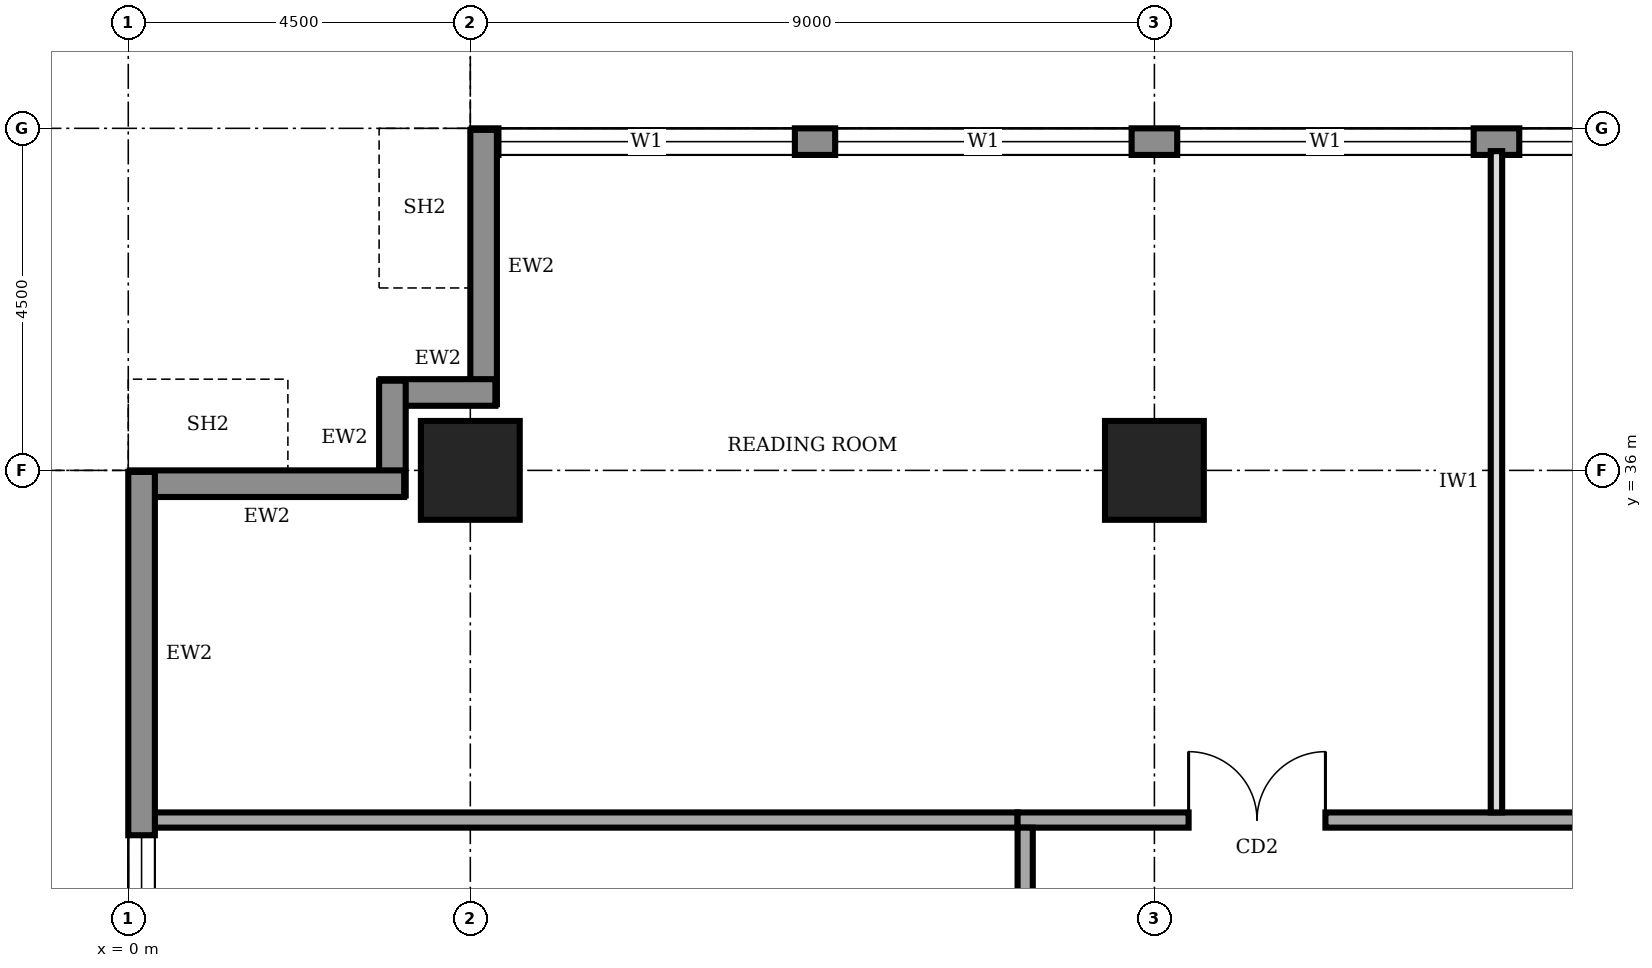
"""IFC4 building model, lengths in metres.
Left out: names, types, materials, properties, quantities, classifications, styles, units other than length and angle.
Written with IfcOpenShell. Run it as: python <this file> out.ifc"""

import sys

from ifc_helpers import new_model, si_unit, direction, frame, frame_2d, origin, origin_2d, place, context, subcontext, project, spatial, rectangle, extrude, element, fill, save


model = new_model("IFC4")
c1 = context("Model", 3, precision=1e-05, world=origin(), true_north=direction((0.0, 1.0)))
c2 = subcontext(c1, "Body", "Model", "MODEL_VIEW")
j1 = project(units=[si_unit("LENGTHUNIT", "METRE"), si_unit("PLANEANGLEUNIT", "RADIAN")], contexts=[c1])
p1 = place(None, origin())
s1 = spatial("IfcSite", under=j1, at=p1, CompositionType="ELEMENT")
p2 = place(p1, origin())
s2 = spatial("IfcBuilding", under=s1, at=p2, CompositionType="ELEMENT")
p3 = place(p2, frame((0.0, 0.0, 285.0)))
s3 = spatial("IfcBuildingStorey", under=s2, at=p3, CompositionType="ELEMENT", Elevation=285.0)
for number, where, z_axis, x_axis in (
    (1, (4.5, 36.0, 0.0), (0.0, 0.0, 1.0), (1.0, 0.0, 0.0)),
    (2, (13.5, 36.0, 0.0), (0.0, 0.0, 1.0), (1.0, 0.0, 0.0)),
):
    element("IfcColumn", number, at=place(p3, frame(where, z_axis=z_axis, x_axis=x_axis)), inside=s3, PredefinedType="COLUMN", context=c2, shape_type="SweptSolid", body=[
        extrude(rectangle(XDim=1.3, YDim=1.3, at=origin_2d()), origin(), (0.0, 0.0, 1.0), 4.0),
    ])
p4 = place(p3, frame((35.98, 40.325, 0.0), z_axis=(0.0, 0.0, 1.0), x_axis=(-1.0, 0.0, 0.0)))
e3 = element("IfcWall", 3, at=p4, inside=s3, PredefinedType="STANDARD", context=c2, shape_type="SweptSolid", body=[
    extrude(rectangle(XDim=31.46, YDim=0.35, at=frame_2d((15.73, 0.0))), origin(), (0.0, 0.0, 1.0), 3.75),
])
p5 = place(p4, frame((27.21, 0.0, 0.9)))
e4 = element("IfcOpeningElement", 4, at=p5, cuts=e3, PredefinedType="OPENING", context=c2, shape_type="SweptSolid", body=[
    extrude(rectangle(XDim=3.9, YDim=2.2, at=frame_2d((1.95, 1.1))), frame((0.0, 0.185, 0.0), z_axis=(0.0, -1.0, 0.0), x_axis=(1.0, 0.0, 0.0)), (0.0, 0.0, 1.0), 0.37),
])
p6 = place(p4, frame((22.78, 0.0, 0.9)))
e5 = element("IfcOpeningElement", 5, at=p6, cuts=e3, PredefinedType="OPENING", context=c2, shape_type="SweptSolid", body=[
    extrude(rectangle(XDim=3.9, YDim=2.2, at=frame_2d((1.95, 1.1))), frame((0.0, 0.185, 0.0), z_axis=(0.0, -1.0, 0.0), x_axis=(1.0, 0.0, 0.0)), (0.0, 0.0, 1.0), 0.37),
])
p7 = place(p4, frame((18.28, 0.0, 0.9)))
e6 = element("IfcOpeningElement", 6, at=p7, cuts=e3, PredefinedType="OPENING", context=c2, shape_type="SweptSolid", body=[
    extrude(rectangle(XDim=3.9, YDim=2.2, at=frame_2d((1.95, 1.1))), frame((0.0, 0.185, 0.0), z_axis=(0.0, -1.0, 0.0), x_axis=(1.0, 0.0, 0.0)), (0.0, 0.0, 1.0), 0.37),
])
p8 = place(p4, frame((13.78, 0.0, 0.9)))
e7 = element("IfcOpeningElement", 7, at=p8, cuts=e3, PredefinedType="OPENING", context=c2, shape_type="SweptSolid", body=[
    extrude(rectangle(XDim=3.9, YDim=2.2, at=frame_2d((1.95, 1.1))), frame((0.0, 0.185, 0.0), z_axis=(0.0, -1.0, 0.0), x_axis=(1.0, 0.0, 0.0)), (0.0, 0.0, 1.0), 0.37),
])
p9 = place(p4, frame((9.28, 0.0, 0.9)))
e8 = element("IfcOpeningElement", 8, at=p9, cuts=e3, PredefinedType="OPENING", context=c2, shape_type="SweptSolid", body=[
    extrude(rectangle(XDim=3.9, YDim=2.2, at=frame_2d((1.95, 1.1))), frame((0.0, 0.185, 0.0), z_axis=(0.0, -1.0, 0.0), x_axis=(1.0, 0.0, 0.0)), (0.0, 0.0, 1.0), 0.37),
])
p10 = place(p4, frame((4.78, 0.0, 0.9)))
e9 = element("IfcOpeningElement", 9, at=p10, cuts=e3, PredefinedType="OPENING", context=c2, shape_type="SweptSolid", body=[
    extrude(rectangle(XDim=3.9, YDim=2.2, at=frame_2d((1.95, 1.1))), frame((0.0, 0.185, 0.0), z_axis=(0.0, -1.0, 0.0), x_axis=(1.0, 0.0, 0.0)), (0.0, 0.0, 1.0), 0.37),
])
p11 = place(p3, frame((4.675, 40.48, 0.0), z_axis=(0.0, 0.0, 1.0), x_axis=(0.0, -1.0, 0.0)))
e10 = element("IfcWall", 10, at=p11, inside=s3, PredefinedType="STANDARD", context=c2, shape_type="SweptSolid", body=[
    extrude(rectangle(XDim=3.61, YDim=0.35, at=frame_2d((1.805, 0.0))), origin(), (0.0, 0.0, 1.0), 2.65),
])
for number, where, z_axis, x_axis in (
    (11, (4.83, 37.025, 0.0), (0.0, 0.0, 1.0), (-1.0, 0.0, 0.0)),
    (12, (3.475, 37.18, 0.0), (0.0, 0.0, 1.0), (0.0, -1.0, 0.0)),
):
    element("IfcWall", number, at=place(p3, frame(where, z_axis=z_axis, x_axis=x_axis)), inside=s3, PredefinedType="STANDARD", context=c2, shape_type="SweptSolid", body=[
        extrude(rectangle(XDim=1.51, YDim=0.35, at=frame_2d((0.755, 0.0))), origin(), (0.0, 0.0, 1.0), 3.75),
    ])
p12 = place(p3, frame((3.63, 35.825, 0.0), z_axis=(0.0, 0.0, 1.0), x_axis=(-1.0, 0.0, 0.0)))
e13 = element("IfcWall", 13, at=p12, inside=s3, PredefinedType="STANDARD", context=c2, shape_type="SweptSolid", body=[
    extrude(rectangle(XDim=3.61, YDim=0.35, at=frame_2d((1.805, 0.0))), origin(), (0.0, 0.0, 1.0), 2.65),
])
p13 = place(p3, frame((0.175, 35.98, 0.0), z_axis=(0.0, 0.0, 1.0), x_axis=(0.0, -1.0, 0.0)))
e14 = element("IfcWall", 14, at=p13, inside=s3, PredefinedType="STANDARD", context=c2, shape_type="SweptSolid", body=[
    extrude(rectangle(XDim=31.46, YDim=0.35, at=frame_2d((15.73, 0.0))), origin(), (0.0, 0.0, 1.0), 3.75),
])
p14 = place(p13, frame((27.21, 0.0, 0.9)))
e15 = element("IfcOpeningElement", 15, at=p14, cuts=e14, PredefinedType="OPENING", context=c2, shape_type="SweptSolid", body=[
    extrude(rectangle(XDim=3.9, YDim=2.2, at=frame_2d((1.95, 1.1))), frame((0.0, 0.185, 0.0), z_axis=(0.0, -1.0, 0.0), x_axis=(1.0, 0.0, 0.0)), (0.0, 0.0, 1.0), 0.37),
])
p15 = place(p13, frame((22.78, 0.0, 0.9)))
e16 = element("IfcOpeningElement", 16, at=p15, cuts=e14, PredefinedType="OPENING", context=c2, shape_type="SweptSolid", body=[
    extrude(rectangle(XDim=3.9, YDim=2.2, at=frame_2d((1.95, 1.1))), frame((0.0, 0.185, 0.0), z_axis=(0.0, -1.0, 0.0), x_axis=(1.0, 0.0, 0.0)), (0.0, 0.0, 1.0), 0.37),
])
p16 = place(p13, frame((18.28, 0.0, 0.9)))
e17 = element("IfcOpeningElement", 17, at=p16, cuts=e14, PredefinedType="OPENING", context=c2, shape_type="SweptSolid", body=[
    extrude(rectangle(XDim=3.9, YDim=2.2, at=frame_2d((1.95, 1.1))), frame((0.0, 0.185, 0.0), z_axis=(0.0, -1.0, 0.0), x_axis=(1.0, 0.0, 0.0)), (0.0, 0.0, 1.0), 0.37),
])
p17 = place(p13, frame((13.78, 0.0, 0.9)))
e18 = element("IfcOpeningElement", 18, at=p17, cuts=e14, PredefinedType="OPENING", context=c2, shape_type="SweptSolid", body=[
    extrude(rectangle(XDim=3.9, YDim=2.2, at=frame_2d((1.95, 1.1))), frame((0.0, 0.185, 0.0), z_axis=(0.0, -1.0, 0.0), x_axis=(1.0, 0.0, 0.0)), (0.0, 0.0, 1.0), 0.37),
])
p18 = place(p13, frame((9.28, 0.0, 0.9)))
e19 = element("IfcOpeningElement", 19, at=p18, cuts=e14, PredefinedType="OPENING", context=c2, shape_type="SweptSolid", body=[
    extrude(rectangle(XDim=3.9, YDim=2.2, at=frame_2d((1.95, 1.1))), frame((0.0, 0.185, 0.0), z_axis=(0.0, -1.0, 0.0), x_axis=(1.0, 0.0, 0.0)), (0.0, 0.0, 1.0), 0.37),
])
p19 = place(p13, frame((4.78, 0.0, 0.9)))
e20 = element("IfcOpeningElement", 20, at=p19, cuts=e14, PredefinedType="OPENING", context=c2, shape_type="SweptSolid", body=[
    extrude(rectangle(XDim=3.9, YDim=2.2, at=frame_2d((1.95, 1.1))), frame((0.0, 0.185, 0.0), z_axis=(0.0, -1.0, 0.0), x_axis=(1.0, 0.0, 0.0)), (0.0, 0.0, 1.0), 0.37),
])
p20 = place(p3, frame((30.1, 31.4, 0.0), z_axis=(0.0, 0.0, 1.0), x_axis=(-1.0, 0.0, 0.0)))
e21 = element("IfcWall", 21, at=p20, inside=s3, PredefinedType="SOLIDWALL", context=c2, shape_type="SweptSolid", body=[
    extrude(rectangle(XDim=18.4, YDim=0.2, at=frame_2d((9.2, 0.0))), origin(), (0.0, 0.0, 1.0), 3.75),
])
p21 = place(p20, frame((14.35, 0.0, 0.0)))
e22 = element("IfcOpeningElement", 22, at=p21, cuts=e21, PredefinedType="OPENING", context=c2, shape_type="SweptSolid", body=[
    extrude(rectangle(XDim=1.8, YDim=2.1, at=frame_2d((0.9, 1.05))), frame((0.0, 0.11, 0.0), z_axis=(0.0, -1.0, 0.0), x_axis=(1.0, 0.0, 0.0)), (0.0, 0.0, 1.0), 0.22),
])
p22 = place(p20, frame((9.35, 0.0, 0.0)))
e23 = element("IfcOpeningElement", 23, at=p22, cuts=e21, PredefinedType="OPENING", context=c2, shape_type="SweptSolid", body=[
    extrude(rectangle(XDim=1.0, YDim=2.1, at=frame_2d((0.5, 1.05))), frame((0.0, 0.11, 0.0), z_axis=(0.0, -1.0, 0.0), x_axis=(1.0, 0.0, 0.0)), (0.0, 0.0, 1.0), 0.22),
])
p23 = place(p20, frame((2.8, 0.0, 0.0)))
e24 = element("IfcOpeningElement", 24, at=p23, cuts=e21, PredefinedType="OPENING", context=c2, shape_type="SweptSolid", body=[
    extrude(rectangle(XDim=1.8, YDim=2.1, at=frame_2d((0.9, 1.05))), frame((0.0, 0.11, 0.0), z_axis=(0.0, -1.0, 0.0), x_axis=(1.0, 0.0, 0.0)), (0.0, 0.0, 1.0), 0.22),
])
p24 = place(p3, frame((11.8, 31.3, 0.0), z_axis=(0.0, 0.0, 1.0), x_axis=(0.0, -1.0, 0.0)))
e25 = element("IfcWall", 25, at=p24, inside=s3, PredefinedType="SOLIDWALL", context=c2, shape_type="SweptSolid", body=[
    extrude(rectangle(XDim=22.3, YDim=0.2, at=frame_2d((11.15, 0.0))), origin(), (0.0, 0.0, 1.0), 3.75),
])
p25 = place(p24, frame((19.55, 0.0, 0.0)))
e26 = element("IfcOpeningElement", 26, at=p25, cuts=e25, PredefinedType="OPENING", context=c2, shape_type="SweptSolid", body=[
    extrude(rectangle(XDim=1.0, YDim=2.1, at=frame_2d((0.5, 1.05))), frame((0.0, 0.11, 0.0), z_axis=(0.0, -1.0, 0.0), x_axis=(1.0, 0.0, 0.0)), (0.0, 0.0, 1.0), 0.22),
])
p26 = place(p24, frame((15.65, 0.0, 0.0)))
e27 = element("IfcOpeningElement", 27, at=p26, cuts=e25, PredefinedType="OPENING", context=c2, shape_type="SweptSolid", body=[
    extrude(rectangle(XDim=0.9, YDim=2.1, at=frame_2d((0.45, 1.05))), frame((0.0, 0.11, 0.0), z_axis=(0.0, -1.0, 0.0), x_axis=(1.0, 0.0, 0.0)), (0.0, 0.0, 1.0), 0.22),
])
p27 = place(p24, frame((10.85, 0.0, 0.0)))
e28 = element("IfcOpeningElement", 28, at=p27, cuts=e25, PredefinedType="OPENING", context=c2, shape_type="SweptSolid", body=[
    extrude(rectangle(XDim=0.9, YDim=2.1, at=frame_2d((0.45, 1.05))), frame((0.0, 0.11, 0.0), z_axis=(0.0, -1.0, 0.0), x_axis=(1.0, 0.0, 0.0)), (0.0, 0.0, 1.0), 0.22),
])
p28 = place(p24, frame((7.8, 0.0, 0.0)))
e29 = element("IfcOpeningElement", 29, at=p28, cuts=e25, PredefinedType="OPENING", context=c2, shape_type="SweptSolid", body=[
    extrude(rectangle(XDim=0.9, YDim=2.1, at=frame_2d((0.45, 1.05))), frame((0.0, 0.11, 0.0), z_axis=(0.0, -1.0, 0.0), x_axis=(1.0, 0.0, 0.0)), (0.0, 0.0, 1.0), 0.22),
])
p29 = place(p24, frame((4.8, 0.0, 0.0)))
e30 = element("IfcOpeningElement", 30, at=p29, cuts=e25, PredefinedType="OPENING", context=c2, shape_type="SweptSolid", body=[
    extrude(rectangle(XDim=1.0, YDim=2.1, at=frame_2d((0.5, 1.05))), frame((0.0, 0.11, 0.0), z_axis=(0.0, -1.0, 0.0), x_axis=(1.0, 0.0, 0.0)), (0.0, 0.0, 1.0), 0.22),
])
p30 = place(p24, frame((12.9, 0.0, 0.0)))
e31 = element("IfcOpeningElement", 31, at=p30, cuts=e25, PredefinedType="OPENING", context=c2, shape_type="SweptSolid", body=[
    extrude(rectangle(XDim=1.0, YDim=2.1, at=frame_2d((0.5, 1.05))), frame((0.0, 0.11, 0.0), z_axis=(0.0, -1.0, 0.0), x_axis=(1.0, 0.0, 0.0)), (0.0, 0.0, 1.0), 0.22),
])
p31 = place(p24, frame((1.55, 0.0, 0.0)))
e32 = element("IfcOpeningElement", 32, at=p31, cuts=e25, PredefinedType="OPENING", context=c2, shape_type="SweptSolid", body=[
    extrude(rectangle(XDim=1.0, YDim=2.1, at=frame_2d((0.5, 1.05))), frame((0.0, 0.11, 0.0), z_axis=(0.0, -1.0, 0.0), x_axis=(1.0, 0.0, 0.0)), (0.0, 0.0, 1.0), 0.22),
])
p32 = place(p3, frame((0.3, 31.4, 0.0), z_axis=(0.0, 0.0, 1.0), x_axis=(1.0, 0.0, 0.0)))
e33 = element("IfcWall", 33, at=p32, inside=s3, PredefinedType="SOLIDWALL", context=c2, shape_type="SweptSolid", body=[
    extrude(rectangle(XDim=11.4, YDim=0.2, at=frame_2d((5.7, 0.0))), origin(), (0.0, 0.0, 1.0), 3.75),
])
p33 = place(p3, frame((18.0, 31.5, 0.0), z_axis=(0.0, 0.0, 1.0), x_axis=(0.0, 1.0, 0.0)))
e34 = element("IfcWall", 34, at=p33, inside=s3, PredefinedType="PARTITIONING", context=c2, shape_type="SweptSolid", body=[
    extrude(rectangle(XDim=8.7, YDim=0.15, at=frame_2d((4.35, 0.0))), origin(), (0.0, 0.0, 1.0), 3.75),
])
p34 = place(p5, origin())
e35 = element("IfcWindow", 35, at=p34, inside=s3, PartitioningType="SINGLE_PANEL", PredefinedType="WINDOW", context=c2, shape_type="SweptSolid", body=[
    extrude(rectangle(XDim=3.9, YDim=2.2, at=frame_2d((1.95, 1.1))), frame((0.0, 0.03, 0.0), z_axis=(0.0, -1.0, 0.0), x_axis=(1.0, 0.0, 0.0)), (0.0, 0.0, 1.0), 0.06),
])
fill(e4, e35)
p35 = place(p6, origin())
e36 = element("IfcWindow", 36, at=p35, inside=s3, PartitioningType="SINGLE_PANEL", PredefinedType="WINDOW", context=c2, shape_type="SweptSolid", body=[
    extrude(rectangle(XDim=3.9, YDim=2.2, at=frame_2d((1.95, 1.1))), frame((0.0, 0.03, 0.0), z_axis=(0.0, -1.0, 0.0), x_axis=(1.0, 0.0, 0.0)), (0.0, 0.0, 1.0), 0.06),
])
fill(e5, e36)
p36 = place(p7, origin())
e37 = element("IfcWindow", 37, at=p36, inside=s3, PartitioningType="SINGLE_PANEL", PredefinedType="WINDOW", context=c2, shape_type="SweptSolid", body=[
    extrude(rectangle(XDim=3.9, YDim=2.2, at=frame_2d((1.95, 1.1))), frame((0.0, 0.03, 0.0), z_axis=(0.0, -1.0, 0.0), x_axis=(1.0, 0.0, 0.0)), (0.0, 0.0, 1.0), 0.06),
])
fill(e6, e37)
p37 = place(p8, origin())
e38 = element("IfcWindow", 38, at=p37, inside=s3, PartitioningType="SINGLE_PANEL", PredefinedType="WINDOW", context=c2, shape_type="SweptSolid", body=[
    extrude(rectangle(XDim=3.9, YDim=2.2, at=frame_2d((1.95, 1.1))), frame((0.0, 0.03, 0.0), z_axis=(0.0, -1.0, 0.0), x_axis=(1.0, 0.0, 0.0)), (0.0, 0.0, 1.0), 0.06),
])
fill(e7, e38)
p38 = place(p19, origin())
e39 = element("IfcWindow", 39, at=p38, inside=s3, PartitioningType="SINGLE_PANEL", PredefinedType="WINDOW", context=c2, shape_type="SweptSolid", body=[
    extrude(rectangle(XDim=3.9, YDim=2.2, at=frame_2d((1.95, 1.1))), frame((0.0, 0.03, 0.0), z_axis=(0.0, -1.0, 0.0), x_axis=(1.0, 0.0, 0.0)), (0.0, 0.0, 1.0), 0.06),
])
fill(e20, e39)
p39 = place(p21, frame((1.8, 0.0, 0.0), z_axis=(0.0, 0.0, 1.0), x_axis=(-1.0, 0.0, 0.0)))
e40 = element("IfcDoor", 40, at=p39, inside=s3, OperationType="DOUBLE_DOOR_SINGLE_SWING", PredefinedType="DOOR", context=c2, shape_type="SweptSolid", body=[
    extrude(rectangle(XDim=1.8, YDim=2.1, at=frame_2d((0.9, 1.05))), frame((0.0, 0.025, 0.0), z_axis=(0.0, -1.0, 0.0), x_axis=(1.0, 0.0, 0.0)), (0.0, 0.0, 1.0), 0.05),
])
fill(e22, e40)
save(model, sys.argv[1])
